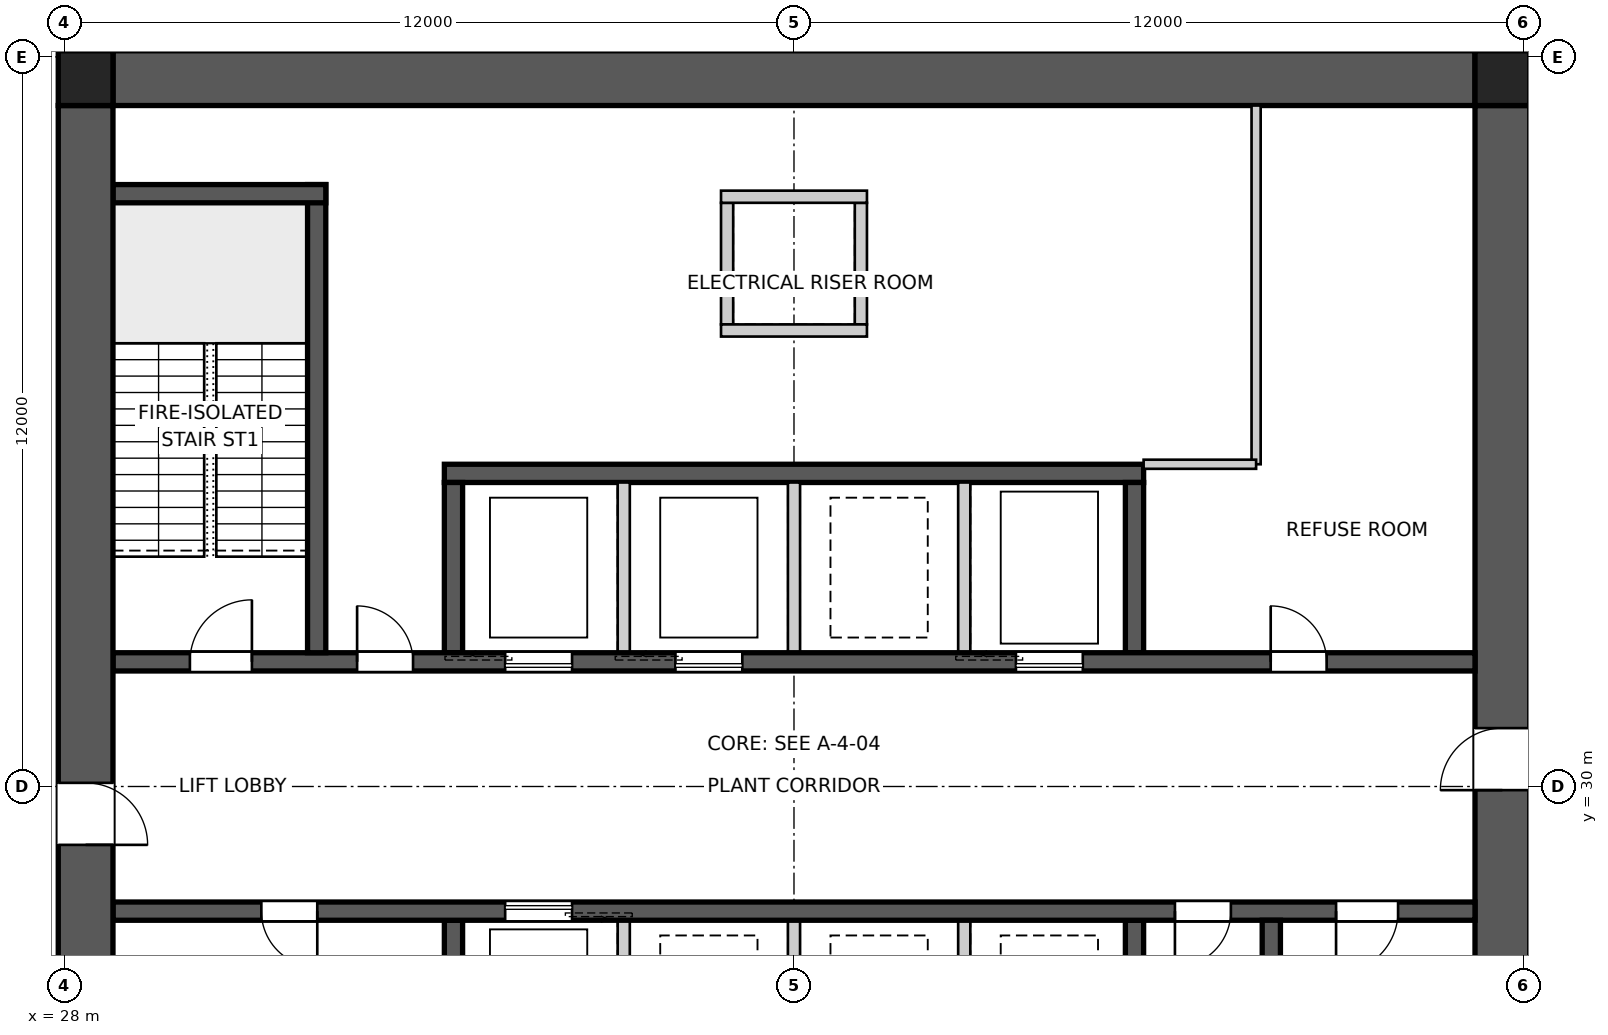
"""IFC4 building model, lengths in metres.
Left out: names, types, materials, properties, quantities, classifications, styles, units other than length and angle.
Written with IfcOpenShell. Run it as: python <this file> out.ifc"""

import sys

from ifc_helpers import new_model, si_unit, direction, frame, frame_2d, origin, origin_2d, place, context, subcontext, project, spatial, polyline, rectangle, outline, extrude, element, fill, save


model = new_model("IFC4")
c1 = context("Model", 3, precision=1e-05, world=origin(), true_north=direction((0.0, 1.0)))
c2 = subcontext(c1, "Body", "Model", "MODEL_VIEW")
j1 = project(units=[si_unit("LENGTHUNIT", "METRE"), si_unit("PLANEANGLEUNIT", "RADIAN")], contexts=[c1])
p1 = place(None, origin())
s1 = spatial("IfcSite", under=j1, at=p1, CompositionType="ELEMENT")
p2 = place(p1, origin())
s2 = spatial("IfcBuilding", under=s1, at=p2, CompositionType="ELEMENT")
p3 = place(p2, frame((0.0, 0.0, 42.2)))
s3 = spatial("IfcBuildingStorey", under=s2, at=p3, CompositionType="ELEMENT", Elevation=42.2)
p4 = place(p3, frame((28.8, 41.65, 0.0), z_axis=(0.0, 0.0, 1.0), x_axis=(1.0, 0.0, 0.0)))
e1 = element("IfcWall", 1, at=p4, inside=s3, PredefinedType="SHEAR", context=c2, shape_type="SweptSolid", body=[
    extrude(outline(polyline([(0.0, -0.45), (22.4, -0.45), (22.4, -0.025), (22.85, -0.025), (22.85, 0.025), (22.4, 0.025), (22.4, 0.45), (0.0, 0.45), (0.0, 0.025), (-0.45, 0.025), (-0.45, -0.025), (0.0, -0.025), (0.0, -0.45)])), origin(), (0.0, 0.0, 1.0), 5.0),
])
p5 = place(p3, frame((51.65, 18.8, 0.0), z_axis=(0.0, 0.0, 1.0), x_axis=(0.0, 1.0, 0.0)))
e2 = element("IfcWall", 2, at=p5, inside=s3, PredefinedType="SHEAR", context=c2, shape_type="SweptSolid", body=[
    extrude(outline(polyline([(0.0, -0.45), (22.4, -0.45), (22.4, -0.025), (22.85, -0.025), (22.85, 0.025), (22.4, 0.025), (22.4, 0.45), (0.0, 0.45), (0.0, 0.025), (-0.45, 0.025), (-0.45, -0.025), (0.0, -0.025), (0.0, -0.45)])), origin(), (0.0, 0.0, 1.0), 5.0),
])
p6 = place(p5, frame((11.14, 0.0, 0.0)))
e3 = element("IfcOpeningElement", 3, at=p6, cuts=e2, PredefinedType="OPENING", context=c2, shape_type="SweptSolid", body=[
    extrude(rectangle(XDim=1.02, YDim=2.4, at=frame_2d((0.51, 1.2))), frame((0.0, 0.46, 0.0), z_axis=(0.0, -1.0, 0.0), x_axis=(1.0, 0.0, 0.0)), (0.0, 0.0, 1.0), 0.92),
])
p7 = place(p3, frame((28.35, 41.2, 0.0), z_axis=(0.0, 0.0, 1.0), x_axis=(0.0, -1.0, 0.0)))
e4 = element("IfcWall", 4, at=p7, inside=s3, PredefinedType="SHEAR", context=c2, shape_type="SweptSolid", body=[
    extrude(outline(polyline([(0.0, -0.45), (22.4, -0.45), (22.4, -0.025), (22.85, -0.025), (22.85, 0.025), (22.4, 0.025), (22.4, 0.45), (0.0, 0.45), (0.0, 0.025), (-0.45, 0.025), (-0.45, -0.025), (0.0, -0.025), (0.0, -0.45)])), origin(), (0.0, 0.0, 1.0), 5.0),
])
p8 = place(p7, frame((11.14, 0.0, 0.0)))
e5 = element("IfcOpeningElement", 5, at=p8, cuts=e4, PredefinedType="OPENING", context=c2, shape_type="SweptSolid", body=[
    extrude(rectangle(XDim=1.02, YDim=2.4, at=frame_2d((0.51, 1.2))), frame((0.0, 0.46, 0.0), z_axis=(0.0, -1.0, 0.0), x_axis=(1.0, 0.0, 0.0)), (0.0, 0.0, 1.0), 0.92),
])
p9 = place(p3, frame((28.8, 32.05, 0.0), z_axis=(0.0, 0.0, 1.0), x_axis=(1.0, 0.0, 0.0)))
e6 = element("IfcWall", 6, at=p9, inside=s3, PredefinedType="SHEAR", context=c2, shape_type="SweptSolid", body=[
    extrude(rectangle(XDim=22.4, YDim=0.3, at=frame_2d((11.2, 0.0))), origin(), (0.0, 0.0, 1.0), 5.0),
])
p10 = place(p9, frame((19.04, 0.0, 0.0)))
e7 = element("IfcOpeningElement", 7, at=p10, cuts=e6, PredefinedType="OPENING", context=c2, shape_type="SweptSolid", body=[
    extrude(rectangle(XDim=0.92, YDim=2.1, at=frame_2d((0.46, 1.05))), frame((0.0, 0.16, 0.0), z_axis=(0.0, -1.0, 0.0), x_axis=(1.0, 0.0, 0.0)), (0.0, 0.0, 1.0), 0.32),
])
p11 = place(p9, frame((1.265, 0.0, 0.0)))
e8 = element("IfcOpeningElement", 8, at=p11, cuts=e6, PredefinedType="OPENING", context=c2, shape_type="SweptSolid", body=[
    extrude(rectangle(XDim=1.02, YDim=2.1, at=frame_2d((0.51, 1.05))), frame((0.0, 0.16, 0.0), z_axis=(0.0, -1.0, 0.0), x_axis=(1.0, 0.0, 0.0)), (0.0, 0.0, 1.0), 0.32),
])
p12 = place(p9, frame((4.015, 0.0, 0.0)))
e9 = element("IfcOpeningElement", 9, at=p12, cuts=e6, PredefinedType="OPENING", context=c2, shape_type="SweptSolid", body=[
    extrude(rectangle(XDim=0.92, YDim=2.1, at=frame_2d((0.46, 1.05))), frame((0.0, 0.16, 0.0), z_axis=(0.0, -1.0, 0.0), x_axis=(1.0, 0.0, 0.0)), (0.0, 0.0, 1.0), 0.32),
])
p13 = place(p9, frame((6.45, 0.0, 0.0)))
e10 = element("IfcOpeningElement", 10, at=p13, cuts=e6, PredefinedType="OPENING", context=c2, shape_type="SweptSolid", body=[
    extrude(rectangle(XDim=1.1, YDim=2.1, at=frame_2d((0.55, 1.05))), frame((0.0, 0.16, 0.0), z_axis=(0.0, -1.0, 0.0), x_axis=(1.0, 0.0, 0.0)), (0.0, 0.0, 1.0), 0.32),
])
p14 = place(p9, frame((9.25, 0.0, 0.0)))
e11 = element("IfcOpeningElement", 11, at=p14, cuts=e6, PredefinedType="OPENING", context=c2, shape_type="SweptSolid", body=[
    extrude(rectangle(XDim=1.1, YDim=2.1, at=frame_2d((0.55, 1.05))), frame((0.0, 0.16, 0.0), z_axis=(0.0, -1.0, 0.0), x_axis=(1.0, 0.0, 0.0)), (0.0, 0.0, 1.0), 0.32),
])
p15 = place(p9, frame((14.85, 0.0, 0.0)))
e12 = element("IfcOpeningElement", 12, at=p15, cuts=e6, PredefinedType="OPENING", context=c2, shape_type="SweptSolid", body=[
    extrude(rectangle(XDim=1.1, YDim=2.1, at=frame_2d((0.55, 1.05))), frame((0.0, 0.16, 0.0), z_axis=(0.0, -1.0, 0.0), x_axis=(1.0, 0.0, 0.0)), (0.0, 0.0, 1.0), 0.32),
])
p16 = place(p3, frame((51.2, 27.95, 0.0), z_axis=(0.0, 0.0, 1.0), x_axis=(-1.0, 0.0, 0.0)))
e13 = element("IfcWall", 13, at=p16, inside=s3, PredefinedType="SHEAR", context=c2, shape_type="SweptSolid", body=[
    extrude(rectangle(XDim=22.4, YDim=0.3, at=frame_2d((11.2, 0.0))), origin(), (0.0, 0.0, 1.0), 5.0),
])
p17 = place(p16, frame((19.04, 0.0, 0.0)))
e14 = element("IfcOpeningElement", 14, at=p17, cuts=e13, PredefinedType="OPENING", context=c2, shape_type="SweptSolid", body=[
    extrude(rectangle(XDim=0.92, YDim=2.1, at=frame_2d((0.46, 1.05))), frame((0.0, 0.16, 0.0), z_axis=(0.0, -1.0, 0.0), x_axis=(1.0, 0.0, 0.0)), (0.0, 0.0, 1.0), 0.32),
])
p18 = place(p16, frame((1.265, 0.0, 0.0)))
e15 = element("IfcOpeningElement", 15, at=p18, cuts=e13, PredefinedType="OPENING", context=c2, shape_type="SweptSolid", body=[
    extrude(rectangle(XDim=1.02, YDim=2.1, at=frame_2d((0.51, 1.05))), frame((0.0, 0.16, 0.0), z_axis=(0.0, -1.0, 0.0), x_axis=(1.0, 0.0, 0.0)), (0.0, 0.0, 1.0), 0.32),
])
p19 = place(p16, frame((4.015, 0.0, 0.0)))
e16 = element("IfcOpeningElement", 16, at=p19, cuts=e13, PredefinedType="OPENING", context=c2, shape_type="SweptSolid", body=[
    extrude(rectangle(XDim=0.92, YDim=2.1, at=frame_2d((0.46, 1.05))), frame((0.0, 0.16, 0.0), z_axis=(0.0, -1.0, 0.0), x_axis=(1.0, 0.0, 0.0)), (0.0, 0.0, 1.0), 0.32),
])
p20 = place(p16, frame((14.85, 0.0, 0.0)))
e17 = element("IfcOpeningElement", 17, at=p20, cuts=e13, PredefinedType="OPENING", context=c2, shape_type="SweptSolid", body=[
    extrude(rectangle(XDim=1.1, YDim=2.1, at=frame_2d((0.55, 1.05))), frame((0.0, 0.16, 0.0), z_axis=(0.0, -1.0, 0.0), x_axis=(1.0, 0.0, 0.0)), (0.0, 0.0, 1.0), 0.32),
])
p21 = place(p3, frame((34.25, 35.15, 0.0), z_axis=(0.0, 0.0, 1.0), x_axis=(1.0, 0.0, 0.0)))
e18 = element("IfcWall", 18, at=p21, inside=s3, PredefinedType="SHEAR", context=c2, shape_type="SweptSolid", body=[
    extrude(rectangle(XDim=11.5, YDim=0.3, at=frame_2d((5.75, 0.0))), origin(), (0.0, 0.0, 1.0), 5.0),
])
for number, where, z_axis, x_axis in (
    (19, (34.4, 32.2, 0.0), (0.0, 0.0, 1.0), (0.0, 1.0, 0.0)),
    (20, (45.6, 27.8, 0.0), (0.0, 0.0, 1.0), (0.0, -1.0, 0.0)),
):
    element("IfcWall", number, at=place(p3, frame(where, z_axis=z_axis, x_axis=x_axis)), inside=s3, PredefinedType="SHEAR", context=c2, shape_type="SweptSolid", body=[
        extrude(rectangle(XDim=2.8, YDim=0.3, at=frame_2d((1.4, 0.0))), origin(), (0.0, 0.0, 1.0), 5.0),
    ])
for number, where, z_axis, x_axis in (
    (21, (37.2, 32.2, 0.0), (0.0, 0.0, 1.0), (0.0, 1.0, 0.0)),
    (22, (42.8, 27.8, 0.0), (0.0, 0.0, 1.0), (0.0, -1.0, 0.0)),
    (23, (40.0, 32.2, 0.0), (0.0, 0.0, 1.0), (0.0, 1.0, 0.0)),
    (24, (40.0, 27.8, 0.0), (0.0, 0.0, 1.0), (0.0, -1.0, 0.0)),
    (25, (42.8, 32.2, 0.0), (0.0, 0.0, 1.0), (0.0, 1.0, 0.0)),
    (26, (37.2, 27.8, 0.0), (0.0, 0.0, 1.0), (0.0, -1.0, 0.0)),
):
    element("IfcWall", number, at=place(p3, frame(where, z_axis=z_axis, x_axis=x_axis)), inside=s3, PredefinedType="SOLIDWALL", context=c2, shape_type="SweptSolid", body=[
        extrude(rectangle(XDim=2.8, YDim=0.2, at=frame_2d((1.4, 0.0))), origin(), (0.0, 0.0, 1.0), 5.0),
    ])
for number, where, z_axis, x_axis in (
    (27, (45.6, 32.2, 0.0), (0.0, 0.0, 1.0), (0.0, 1.0, 0.0)),
    (28, (34.4, 27.8, 0.0), (0.0, 0.0, 1.0), (0.0, -1.0, 0.0)),
):
    element("IfcWall", number, at=place(p3, frame(where, z_axis=z_axis, x_axis=x_axis)), inside=s3, PredefinedType="SHEAR", context=c2, shape_type="SweptSolid", body=[
        extrude(rectangle(XDim=2.8, YDim=0.3, at=frame_2d((1.4, 0.0))), origin(), (0.0, 0.0, 1.0), 5.0),
    ])
p22 = place(p3, frame((32.15, 32.2, 0.0), z_axis=(0.0, 0.0, 1.0), x_axis=(0.0, 1.0, 0.0)))
e29 = element("IfcWall", 29, at=p22, inside=s3, PredefinedType="SHEAR", context=c2, shape_type="SweptSolid", body=[
    extrude(rectangle(XDim=7.7, YDim=0.3, at=frame_2d((3.85, 0.0))), origin(), (0.0, 0.0, 1.0), 5.0),
])
p23 = place(p3, frame((28.8, 39.75, 0.0), z_axis=(0.0, 0.0, 1.0), x_axis=(1.0, 0.0, 0.0)))
e30 = element("IfcWall", 30, at=p23, inside=s3, PredefinedType="SHEAR", context=c2, shape_type="SweptSolid", body=[
    extrude(rectangle(XDim=3.5, YDim=0.3, at=frame_2d((1.75, 0.0))), origin(), (0.0, 0.0, 1.0), 5.0),
])
p24 = place(p3, frame((47.85, 27.8, 0.0), z_axis=(0.0, 0.0, 1.0), x_axis=(0.0, -1.0, 0.0)))
e31 = element("IfcWall", 31, at=p24, inside=s3, PredefinedType="SHEAR", context=c2, shape_type="SweptSolid", body=[
    extrude(rectangle(XDim=7.7, YDim=0.3, at=frame_2d((3.85, 0.0))), origin(), (0.0, 0.0, 1.0), 5.0),
])
for number, where, z_axis, x_axis in (
    (32, (38.9, 37.6, 0.0), (0.0, 0.0, 1.0), (0.0, 1.0, 0.0)),
    (33, (41.1, 37.6, 0.0), (0.0, 0.0, 1.0), (0.0, 1.0, 0.0)),
):
    element("IfcWall", number, at=place(p3, frame(where, z_axis=z_axis, x_axis=x_axis)), inside=s3, PredefinedType="SOLIDWALL", context=c2, shape_type="SweptSolid", body=[
        extrude(rectangle(XDim=2.0, YDim=0.2, at=frame_2d((1.0, 0.0))), origin(), (0.0, 0.0, 1.0), 5.0),
    ])
for number, where, z_axis, x_axis in (
    (34, (38.8, 37.5, 0.0), (0.0, 0.0, 1.0), (1.0, 0.0, 0.0)),
    (35, (38.8, 39.7, 0.0), (0.0, 0.0, 1.0), (1.0, 0.0, 0.0)),
):
    element("IfcWall", number, at=place(p3, frame(where, z_axis=z_axis, x_axis=x_axis)), inside=s3, PredefinedType="SOLIDWALL", context=c2, shape_type="SweptSolid", body=[
        extrude(rectangle(XDim=2.4, YDim=0.2, at=frame_2d((1.2, 0.0))), origin(), (0.0, 0.0, 1.0), 5.0),
    ])
for number, where, z_axis, x_axis in (
    (36, (51.65, 41.65, 0.0), (0.0, 0.0, 1.0), (1.0, 0.0, 0.0)),
    (37, (28.35, 41.65, 0.0), (0.0, 0.0, 1.0), (1.0, 0.0, 0.0)),
):
    element("IfcColumn", number, at=place(p3, frame(where, z_axis=z_axis, x_axis=x_axis)), inside=s3, PredefinedType="COLUMN", context=c2, shape_type="SweptSolid", body=[
        extrude(rectangle(XDim=0.9, YDim=0.9, at=origin_2d()), origin(), (0.0, 0.0, 1.0), 5.0),
    ])
p25 = place(p3, frame((47.6, 41.2, 0.0), z_axis=(0.0, 0.0, 1.0), x_axis=(0.0, -1.0, 0.0)))
e38 = element("IfcWall", 38, at=p25, inside=s3, PredefinedType="SOLIDWALL", context=c2, shape_type="SweptSolid", body=[
    extrude(rectangle(XDim=5.9, YDim=0.15, at=frame_2d((2.95, 0.0))), origin(), (0.0, 0.0, 1.0), 4.85),
])
p26 = place(p3, frame((47.6, 35.3, 0.0), z_axis=(0.0, 0.0, 1.0), x_axis=(-1.0, 0.0, 0.0)))
e39 = element("IfcWall", 39, at=p26, inside=s3, PredefinedType="SOLIDWALL", context=c2, shape_type="SweptSolid", body=[
    extrude(rectangle(XDim=1.85, YDim=0.15, at=frame_2d((0.925, 0.0))), origin(), (0.0, 0.0, 1.0), 4.85),
])
p27 = place(p10, origin())
e40 = element("IfcDoor", 40, at=p27, inside=s3, OperationType="SINGLE_SWING_LEFT", PredefinedType="DOOR", context=c2, shape_type="SweptSolid", body=[
    extrude(rectangle(XDim=0.92, YDim=2.1, at=frame_2d((0.46, 1.05))), frame((0.0, 0.025, 0.0), z_axis=(0.0, -1.0, 0.0), x_axis=(1.0, 0.0, 0.0)), (0.0, 0.0, 1.0), 0.05),
])
fill(e7, e40)
p28 = place(p17, origin())
e41 = element("IfcDoor", 41, at=p28, inside=s3, OperationType="SINGLE_SWING_LEFT", PredefinedType="DOOR", context=c2, shape_type="SweptSolid", body=[
    extrude(rectangle(XDim=0.92, YDim=2.1, at=frame_2d((0.46, 1.05))), frame((0.0, 0.025, 0.0), z_axis=(0.0, -1.0, 0.0), x_axis=(1.0, 0.0, 0.0)), (0.0, 0.0, 1.0), 0.05),
])
fill(e14, e41)
p29 = place(p18, origin())
e42 = element("IfcDoor", 42, at=p29, inside=s3, OperationType="SINGLE_SWING_RIGHT", PredefinedType="DOOR", context=c2, shape_type="SweptSolid", body=[
    extrude(rectangle(XDim=1.02, YDim=2.1, at=frame_2d((0.51, 1.05))), frame((0.0, 0.025, 0.0), z_axis=(0.0, -1.0, 0.0), x_axis=(1.0, 0.0, 0.0)), (0.0, 0.0, 1.0), 0.05),
])
fill(e15, e42)
p30 = place(p11, origin())
e43 = element("IfcDoor", 43, at=p30, inside=s3, OperationType="SINGLE_SWING_RIGHT", PredefinedType="DOOR", context=c2, shape_type="SweptSolid", body=[
    extrude(rectangle(XDim=1.02, YDim=2.1, at=frame_2d((0.51, 1.05))), frame((0.0, 0.025, 0.0), z_axis=(0.0, -1.0, 0.0), x_axis=(1.0, 0.0, 0.0)), (0.0, 0.0, 1.0), 0.05),
])
fill(e8, e43)
p31 = place(p12, origin())
e44 = element("IfcDoor", 44, at=p31, inside=s3, OperationType="SINGLE_SWING_LEFT", PredefinedType="DOOR", context=c2, shape_type="SweptSolid", body=[
    extrude(rectangle(XDim=0.92, YDim=2.1, at=frame_2d((0.46, 1.05))), frame((0.0, 0.025, 0.0), z_axis=(0.0, -1.0, 0.0), x_axis=(1.0, 0.0, 0.0)), (0.0, 0.0, 1.0), 0.05),
])
fill(e9, e44)
p32 = place(p19, origin())
e45 = element("IfcDoor", 45, at=p32, inside=s3, OperationType="SINGLE_SWING_RIGHT", PredefinedType="DOOR", context=c2, shape_type="SweptSolid", body=[
    extrude(rectangle(XDim=0.92, YDim=2.1, at=frame_2d((0.46, 1.05))), frame((0.0, 0.025, 0.0), z_axis=(0.0, -1.0, 0.0), x_axis=(1.0, 0.0, 0.0)), (0.0, 0.0, 1.0), 0.05),
])
fill(e16, e45)
p33 = place(p6, origin())
e46 = element("IfcDoor", 46, at=p33, inside=s3, OperationType="SINGLE_SWING_LEFT", PredefinedType="DOOR", context=c2, shape_type="SweptSolid", body=[
    extrude(rectangle(XDim=1.02, YDim=2.4, at=frame_2d((0.51, 1.2))), frame((0.0, 0.025, 0.0), z_axis=(0.0, -1.0, 0.0), x_axis=(1.0, 0.0, 0.0)), (0.0, 0.0, 1.0), 0.05),
])
fill(e3, e46)
p34 = place(p8, origin())
e47 = element("IfcDoor", 47, at=p34, inside=s3, OperationType="SINGLE_SWING_RIGHT", PredefinedType="DOOR", context=c2, shape_type="SweptSolid", body=[
    extrude(rectangle(XDim=1.02, YDim=2.4, at=frame_2d((0.51, 1.2))), frame((0.0, 0.025, 0.0), z_axis=(0.0, -1.0, 0.0), x_axis=(1.0, 0.0, 0.0)), (0.0, 0.0, 1.0), 0.05),
])
fill(e5, e47)
p35 = place(p13, origin())
e48 = element("IfcDoor", 48, at=p35, inside=s3, OperationType="SLIDING_TO_LEFT", PredefinedType="DOOR", context=c2, shape_type="SweptSolid", body=[
    extrude(rectangle(XDim=1.1, YDim=2.1, at=frame_2d((0.55, 1.05))), frame((0.0, 0.025, 0.0), z_axis=(0.0, -1.0, 0.0), x_axis=(1.0, 0.0, 0.0)), (0.0, 0.0, 1.0), 0.05),
])
fill(e10, e48)
p36 = place(p14, origin())
e49 = element("IfcDoor", 49, at=p36, inside=s3, OperationType="SLIDING_TO_LEFT", PredefinedType="DOOR", context=c2, shape_type="SweptSolid", body=[
    extrude(rectangle(XDim=1.1, YDim=2.1, at=frame_2d((0.55, 1.05))), frame((0.0, 0.025, 0.0), z_axis=(0.0, -1.0, 0.0), x_axis=(1.0, 0.0, 0.0)), (0.0, 0.0, 1.0), 0.05),
])
fill(e11, e49)
p37 = place(p15, origin())
e50 = element("IfcDoor", 50, at=p37, inside=s3, OperationType="SLIDING_TO_LEFT", PredefinedType="DOOR", context=c2, shape_type="SweptSolid", body=[
    extrude(rectangle(XDim=1.1, YDim=2.1, at=frame_2d((0.55, 1.05))), frame((0.0, 0.025, 0.0), z_axis=(0.0, -1.0, 0.0), x_axis=(1.0, 0.0, 0.0)), (0.0, 0.0, 1.0), 0.05),
])
fill(e12, e50)
p38 = place(p20, origin())
e51 = element("IfcDoor", 51, at=p38, inside=s3, OperationType="SLIDING_TO_LEFT", PredefinedType="DOOR", context=c2, shape_type="SweptSolid", body=[
    extrude(rectangle(XDim=1.1, YDim=2.1, at=frame_2d((0.55, 1.05))), frame((0.0, 0.025, 0.0), z_axis=(0.0, -1.0, 0.0), x_axis=(1.0, 0.0, 0.0)), (0.0, 0.0, 1.0), 0.05),
])
fill(e17, e51)
save(model, sys.argv[1])
